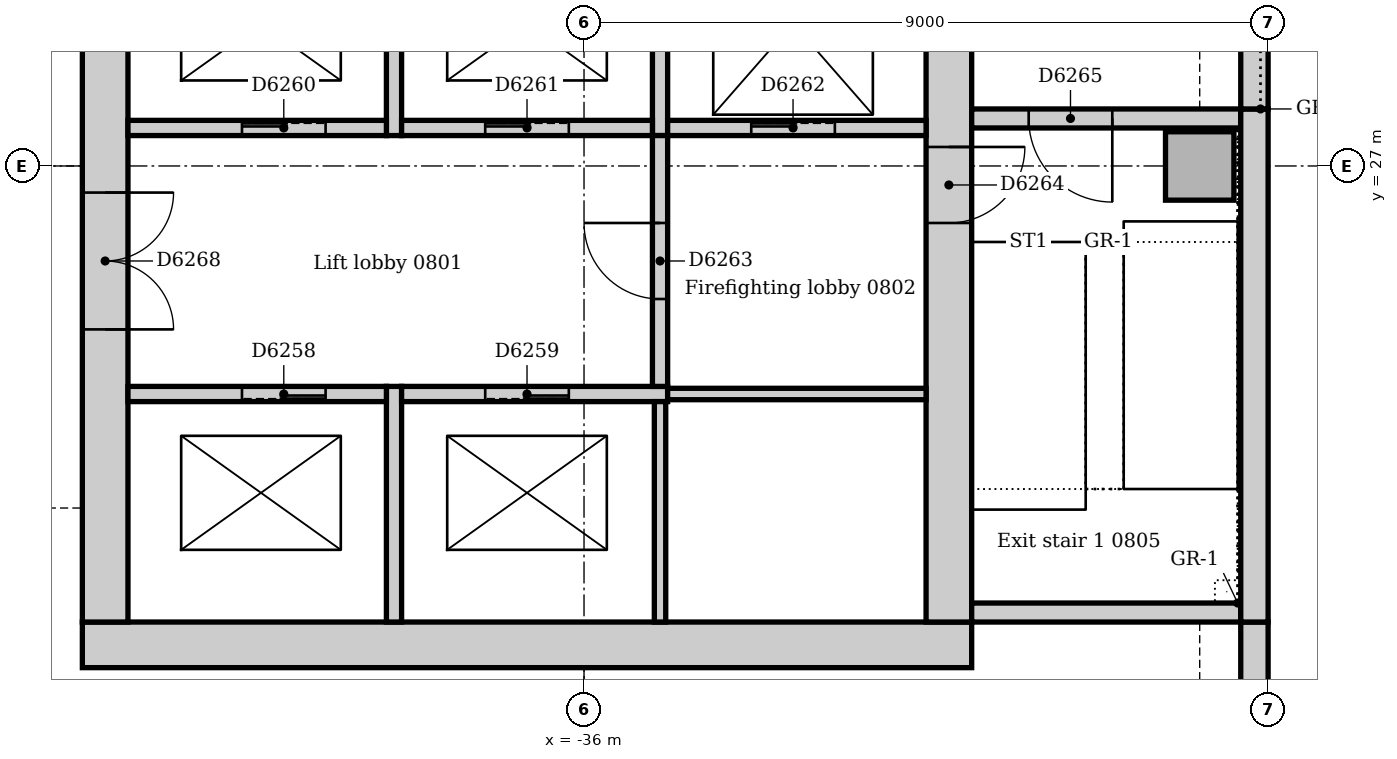
"""IFC4 building model, lengths in metres.
Left out: names, types, materials, properties, quantities, classifications, styles, units other than length and angle.
Written with IfcOpenShell. Run it as: python <this file> out.ifc"""

import sys

from ifc_helpers import new_model, si_unit, direction, frame, frame_2d, origin, origin_2d, place, context, subcontext, project, spatial, rectangle, extrude, element, fill, save


model = new_model("IFC4")
c1 = context("Model", 3, precision=1e-05, world=origin(), true_north=direction((0.0, 1.0)))
c2 = subcontext(c1, "Body", "Model", "MODEL_VIEW")
j1 = project(units=[si_unit("LENGTHUNIT", "METRE"), si_unit("PLANEANGLEUNIT", "RADIAN")], contexts=[c1])
p1 = place(None, origin())
s1 = spatial("IfcSite", under=j1, at=p1, CompositionType="ELEMENT")
p2 = place(p1, origin())
s2 = spatial("IfcBuilding", under=s1, at=p2, CompositionType="ELEMENT")
p3 = place(p2, frame((0.0, 0.0, 38.0)))
s3 = spatial("IfcBuildingStorey", under=s2, at=p3, CompositionType="ELEMENT", Elevation=38.0)
p4 = place(p3, frame((-42.6, 20.7, 0.0), z_axis=(0.0, 0.0, 1.0), x_axis=(1.0, 0.0, 0.0)))
e1 = element("IfcWall", 1, at=p4, inside=s3, PredefinedType="SOLIDWALL", context=c2, shape_type="SweptSolid", body=[
    extrude(rectangle(XDim=11.7, YDim=0.6, at=frame_2d((5.85, 0.0))), origin(), (0.0, 0.0, 1.0), 4.0),
])
p5 = place(p3, frame((-31.2, 21.0, 0.0), z_axis=(0.0, 0.0, 1.0), x_axis=(0.0, 1.0, 0.0)))
e2 = element("IfcWall", 2, at=p5, inside=s3, PredefinedType="SOLIDWALL", context=c2, shape_type="SweptSolid", body=[
    extrude(rectangle(XDim=9.5, YDim=0.6, at=frame_2d((4.75, 0.0))), origin(), (0.0, 0.0, 1.0), 4.0),
])
p6 = place(p5, frame((5.25, 0.0, 0.0)))
e3 = element("IfcOpeningElement", 3, at=p6, cuts=e2, PredefinedType="OPENING", context=c2, shape_type="SweptSolid", body=[
    extrude(rectangle(XDim=1.0, YDim=2.1, at=frame_2d((0.5, 1.05))), frame((0.0, 0.31, 0.0), z_axis=(0.0, -1.0, 0.0), x_axis=(1.0, 0.0, 0.0)), (0.0, 0.0, 1.0), 0.62),
])
p7 = place(p3, frame((-42.3, 30.5, 0.0), z_axis=(0.0, 0.0, 1.0), x_axis=(0.0, -1.0, 0.0)))
e4 = element("IfcWall", 4, at=p7, inside=s3, PredefinedType="SOLIDWALL", context=c2, shape_type="SweptSolid", body=[
    extrude(rectangle(XDim=9.5, YDim=0.6, at=frame_2d((4.75, 0.0))), origin(), (0.0, 0.0, 1.0), 4.0),
])
p8 = place(p7, frame((3.85, 0.0, 0.0)))
e5 = element("IfcOpeningElement", 5, at=p8, cuts=e4, PredefinedType="OPENING", context=c2, shape_type="SweptSolid", body=[
    extrude(rectangle(XDim=1.8, YDim=2.1, at=frame_2d((0.9, 1.05))), frame((0.0, 0.31, 0.0), z_axis=(0.0, -1.0, 0.0), x_axis=(1.0, 0.0, 0.0)), (0.0, 0.0, 1.0), 0.62),
])
p9 = place(p3, frame((-30.9, 21.125, 0.0), z_axis=(0.0, 0.0, 1.0), x_axis=(1.0, 0.0, 0.0)))
e6 = element("IfcWall", 6, at=p9, inside=s3, PredefinedType="SOLIDWALL", context=c2, shape_type="SweptSolid", body=[
    extrude(rectangle(XDim=3.54, YDim=0.25, at=frame_2d((1.77, 0.0))), origin(), (0.0, 0.0, 1.0), 4.0),
])
p10 = place(p3, frame((-27.36, 27.625, 0.0), z_axis=(0.0, 0.0, 1.0), x_axis=(-1.0, 0.0, 0.0)))
e7 = element("IfcWall", 7, at=p10, inside=s3, PredefinedType="SOLIDWALL", context=c2, shape_type="SweptSolid", body=[
    extrude(rectangle(XDim=3.54, YDim=0.25, at=frame_2d((1.77, 0.0))), origin(), (0.0, 0.0, 1.0), 4.0),
])
p11 = place(p10, frame((1.69, 0.0, 0.0)))
e8 = element("IfcOpeningElement", 8, at=p11, cuts=e7, PredefinedType="OPENING", context=c2, shape_type="SweptSolid", body=[
    extrude(rectangle(XDim=1.1, YDim=2.1, at=frame_2d((0.55, 1.05))), frame((0.0, 0.135, 0.0), z_axis=(0.0, -1.0, 0.0), x_axis=(1.0, 0.0, 0.0)), (0.0, 0.0, 1.0), 0.27),
])
p12 = place(p3, frame((-27.9, 27.0, 0.0), z_axis=(0.0, 0.0, 1.0), x_axis=(1.0, 0.0, 0.0)))
e9 = element("IfcColumn", 9, at=p12, inside=s3, PredefinedType="COLUMN", context=c2, shape_type="SweptSolid", body=[
    extrude(rectangle(XDim=0.9, YDim=0.9, at=origin_2d()), origin(), (0.0, 0.0, 1.0), 4.0),
])
p13 = place(p3, frame((-27.18, 8.743, 0.0), z_axis=(0.0, 0.0, 1.0), x_axis=(0.0, 1.0, 0.0)))
e10 = element("IfcWall", 10, at=p13, inside=s3, PredefinedType="STANDARD", context=c2, shape_type="SweptSolid", body=[
    extrude(rectangle(XDim=12.257, YDim=0.36, at=frame_2d((6.129, 0.0))), origin(), (0.0, 0.0, 1.0), 3.85),
])
p14 = place(p13, frame((2.607, 0.0, 0.9)))
e11 = element("IfcOpeningElement", 11, at=p14, cuts=e10, PredefinedType="OPENING", context=c2, shape_type="SweptSolid", body=[
    extrude(rectangle(XDim=3.3, YDim=1.6, at=frame_2d((1.65, 0.8))), frame((0.0, 0.19, 0.0), z_axis=(0.0, -1.0, 0.0), x_axis=(1.0, 0.0, 0.0)), (0.0, 0.0, 1.0), 0.38),
])
p15 = place(p13, frame((7.607, 0.0, 0.9)))
e12 = element("IfcOpeningElement", 12, at=p15, cuts=e10, PredefinedType="OPENING", context=c2, shape_type="SweptSolid", body=[
    extrude(rectangle(XDim=3.3, YDim=1.6, at=frame_2d((1.65, 0.8))), frame((0.0, 0.19, 0.0), z_axis=(0.0, -1.0, 0.0), x_axis=(1.0, 0.0, 0.0)), (0.0, 0.0, 1.0), 0.38),
])
p16 = place(p3, frame((-27.18, 21.0, 0.0), z_axis=(0.0, 0.0, 1.0), x_axis=(0.0, 1.0, 0.0)))
e13 = element("IfcWall", 13, at=p16, inside=s3, PredefinedType="STANDARD", context=c2, shape_type="SweptSolid", body=[
    extrude(rectangle(XDim=6.75, YDim=0.36, at=frame_2d((3.375, 0.0))), origin(), (0.0, 0.0, 1.0), 3.85),
])
p17 = place(p3, frame((-27.18, 27.75, 0.0), z_axis=(0.0, 0.0, 1.0), x_axis=(0.0, 1.0, 0.0)))
e14 = element("IfcWall", 14, at=p17, inside=s3, PredefinedType="STANDARD", context=c2, shape_type="SweptSolid", body=[
    extrude(rectangle(XDim=7.5, YDim=0.36, at=frame_2d((3.75, 0.0))), origin(), (0.0, 0.0, 1.0), 3.85),
])
p18 = place(p17, frame((2.85, 0.0, 1.2)))
e15 = element("IfcOpeningElement", 15, at=p18, cuts=e14, PredefinedType="OPENING", context=c2, shape_type="SweptSolid", body=[
    extrude(rectangle(XDim=1.8, YDim=1.2, at=frame_2d((0.9, 0.6))), frame((0.0, 0.19, 0.0), z_axis=(0.0, -1.0, 0.0), x_axis=(1.0, 0.0, 0.0)), (0.0, 0.0, 1.0), 0.38),
])
p19 = place(p3, frame((-38.5, 21.0, 0.0), z_axis=(0.0, 0.0, 1.0), x_axis=(0.0, 1.0, 0.0)))
e16 = element("IfcWall", 16, at=p19, inside=s3, PredefinedType="SOLIDWALL", context=c2, shape_type="SweptSolid", body=[
    extrude(rectangle(XDim=3.1, YDim=0.2, at=frame_2d((1.55, 0.0))), origin(), (0.0, 0.0, 1.0), 4.0),
])
p20 = place(p3, frame((-38.6, 24.0, 0.0), z_axis=(0.0, 0.0, 1.0), x_axis=(-1.0, 0.0, 0.0)))
e17 = element("IfcWall", 17, at=p20, inside=s3, PredefinedType="SOLIDWALL", context=c2, shape_type="SweptSolid", body=[
    extrude(rectangle(XDim=3.4, YDim=0.2, at=frame_2d((1.7, 0.0))), origin(), (0.0, 0.0, 1.0), 4.0),
])
p21 = place(p20, frame((0.8, 0.0, 0.0)))
e18 = element("IfcOpeningElement", 18, at=p21, cuts=e17, PredefinedType="OPENING", context=c2, shape_type="SweptSolid", body=[
    extrude(rectangle(XDim=1.1, YDim=2.1, at=frame_2d((0.55, 1.05))), frame((0.0, 0.11, 0.0), z_axis=(0.0, -1.0, 0.0), x_axis=(1.0, 0.0, 0.0)), (0.0, 0.0, 1.0), 0.22),
])
p22 = place(p3, frame((-34.9, 24.0, 0.0), z_axis=(0.0, 0.0, 1.0), x_axis=(-1.0, 0.0, 0.0)))
e19 = element("IfcWall", 19, at=p22, inside=s3, PredefinedType="SOLIDWALL", context=c2, shape_type="SweptSolid", body=[
    extrude(rectangle(XDim=3.5, YDim=0.2, at=frame_2d((1.75, 0.0))), origin(), (0.0, 0.0, 1.0), 4.0),
])
p23 = place(p22, frame((1.3, 0.0, 0.0)))
e20 = element("IfcOpeningElement", 20, at=p23, cuts=e19, PredefinedType="OPENING", context=c2, shape_type="SweptSolid", body=[
    extrude(rectangle(XDim=1.1, YDim=2.1, at=frame_2d((0.55, 1.05))), frame((0.0, 0.11, 0.0), z_axis=(0.0, -1.0, 0.0), x_axis=(1.0, 0.0, 0.0)), (0.0, 0.0, 1.0), 0.22),
])
p24 = place(p3, frame((-38.5, 27.4, 0.0), z_axis=(0.0, 0.0, 1.0), x_axis=(0.0, 1.0, 0.0)))
e21 = element("IfcWall", 21, at=p24, inside=s3, PredefinedType="SOLIDWALL", context=c2, shape_type="SweptSolid", body=[
    extrude(rectangle(XDim=2.85, YDim=0.2, at=frame_2d((1.425, 0.0))), origin(), (0.0, 0.0, 1.0), 4.0),
])
p25 = place(p3, frame((-42.0, 27.5, 0.0), z_axis=(0.0, 0.0, 1.0), x_axis=(1.0, 0.0, 0.0)))
e22 = element("IfcWall", 22, at=p25, inside=s3, PredefinedType="SOLIDWALL", context=c2, shape_type="SweptSolid", body=[
    extrude(rectangle(XDim=3.4, YDim=0.2, at=frame_2d((1.7, 0.0))), origin(), (0.0, 0.0, 1.0), 4.0),
])
p26 = place(p25, frame((1.5, 0.0, 0.0)))
e23 = element("IfcOpeningElement", 23, at=p26, cuts=e22, PredefinedType="OPENING", context=c2, shape_type="SweptSolid", body=[
    extrude(rectangle(XDim=1.1, YDim=2.1, at=frame_2d((0.55, 1.05))), frame((0.0, 0.11, 0.0), z_axis=(0.0, -1.0, 0.0), x_axis=(1.0, 0.0, 0.0)), (0.0, 0.0, 1.0), 0.22),
])
p27 = place(p3, frame((-35.0, 27.4, 0.0), z_axis=(0.0, 0.0, 1.0), x_axis=(0.0, 1.0, 0.0)))
e24 = element("IfcWall", 24, at=p27, inside=s3, PredefinedType="SOLIDWALL", context=c2, shape_type="SweptSolid", body=[
    extrude(rectangle(XDim=2.85, YDim=0.2, at=frame_2d((1.425, 0.0))), origin(), (0.0, 0.0, 1.0), 4.0),
])
p28 = place(p3, frame((-38.4, 27.5, 0.0), z_axis=(0.0, 0.0, 1.0), x_axis=(1.0, 0.0, 0.0)))
e25 = element("IfcWall", 25, at=p28, inside=s3, PredefinedType="SOLIDWALL", context=c2, shape_type="SweptSolid", body=[
    extrude(rectangle(XDim=3.3, YDim=0.2, at=frame_2d((1.65, 0.0))), origin(), (0.0, 0.0, 1.0), 4.0),
])
p29 = place(p28, frame((1.1, 0.0, 0.0)))
e26 = element("IfcOpeningElement", 26, at=p29, cuts=e25, PredefinedType="OPENING", context=c2, shape_type="SweptSolid", body=[
    extrude(rectangle(XDim=1.1, YDim=2.1, at=frame_2d((0.55, 1.05))), frame((0.0, 0.11, 0.0), z_axis=(0.0, -1.0, 0.0), x_axis=(1.0, 0.0, 0.0)), (0.0, 0.0, 1.0), 0.22),
])
p30 = place(p3, frame((-34.9, 27.5, 0.0), z_axis=(0.0, 0.0, 1.0), x_axis=(1.0, 0.0, 0.0)))
e27 = element("IfcWall", 27, at=p30, inside=s3, PredefinedType="SOLIDWALL", context=c2, shape_type="SweptSolid", body=[
    extrude(rectangle(XDim=3.4, YDim=0.2, at=frame_2d((1.7, 0.0))), origin(), (0.0, 0.0, 1.0), 4.0),
])
p31 = place(p30, frame((1.1, 0.0, 0.0)))
e28 = element("IfcOpeningElement", 28, at=p31, cuts=e27, PredefinedType="OPENING", context=c2, shape_type="SweptSolid", body=[
    extrude(rectangle(XDim=1.1, YDim=2.1, at=frame_2d((0.55, 1.05))), frame((0.0, 0.11, 0.0), z_axis=(0.0, -1.0, 0.0), x_axis=(1.0, 0.0, 0.0)), (0.0, 0.0, 1.0), 0.22),
])
p32 = place(p3, frame((-35.0, 24.1, 0.0), z_axis=(0.0, 0.0, 1.0), x_axis=(0.0, 1.0, 0.0)))
e29 = element("IfcWall", 29, at=p32, inside=s3, PredefinedType="SOLIDWALL", context=c2, shape_type="SweptSolid", body=[
    extrude(rectangle(XDim=3.3, YDim=0.2, at=frame_2d((1.65, 0.0))), origin(), (0.0, 0.0, 1.0), 4.0),
])
p33 = place(p32, frame((1.15, 0.0, 0.0)))
e30 = element("IfcOpeningElement", 30, at=p33, cuts=e29, PredefinedType="OPENING", context=c2, shape_type="SweptSolid", body=[
    extrude(rectangle(XDim=1.0, YDim=2.1, at=frame_2d((0.5, 1.05))), frame((0.0, 0.11, 0.0), z_axis=(0.0, -1.0, 0.0), x_axis=(1.0, 0.0, 0.0)), (0.0, 0.0, 1.0), 0.22),
])
p34 = place(p3, frame((-35.0, 21.0, 0.0), z_axis=(0.0, 0.0, 1.0), x_axis=(0.0, 1.0, 0.0)))
e31 = element("IfcWall", 31, at=p34, inside=s3, PredefinedType="SOLIDWALL", context=c2, shape_type="SweptSolid", body=[
    extrude(rectangle(XDim=2.9, YDim=0.15, at=frame_2d((1.45, 0.0))), origin(), (0.0, 0.0, 1.0), 4.0),
])
p35 = place(p3, frame((-31.5, 24.0, 0.0), z_axis=(0.0, 0.0, 1.0), x_axis=(-1.0, 0.0, 0.0)))
e32 = element("IfcWall", 32, at=p35, inside=s3, PredefinedType="SOLIDWALL", context=c2, shape_type="SweptSolid", body=[
    extrude(rectangle(XDim=3.4, YDim=0.15, at=frame_2d((1.7, 0.0))), origin(), (0.0, 0.0, 1.0), 4.0),
])
p36 = place(p21, origin())
e33 = element("IfcDoor", 33, at=p36, inside=s3, OperationType="SLIDING_TO_LEFT", PredefinedType="DOOR", context=c2, shape_type="SweptSolid", body=[
    extrude(rectangle(XDim=1.1, YDim=2.1, at=frame_2d((0.55, 1.05))), frame((0.0, 0.025, 0.0), z_axis=(0.0, -1.0, 0.0), x_axis=(1.0, 0.0, 0.0)), (0.0, 0.0, 1.0), 0.05),
])
fill(e18, e33)
p37 = place(p23, origin())
e34 = element("IfcDoor", 34, at=p37, inside=s3, OperationType="SLIDING_TO_LEFT", PredefinedType="DOOR", context=c2, shape_type="SweptSolid", body=[
    extrude(rectangle(XDim=1.1, YDim=2.1, at=frame_2d((0.55, 1.05))), frame((0.0, 0.025, 0.0), z_axis=(0.0, -1.0, 0.0), x_axis=(1.0, 0.0, 0.0)), (0.0, 0.0, 1.0), 0.05),
])
fill(e20, e34)
p38 = place(p26, origin())
e35 = element("IfcDoor", 35, at=p38, inside=s3, OperationType="SLIDING_TO_LEFT", PredefinedType="DOOR", context=c2, shape_type="SweptSolid", body=[
    extrude(rectangle(XDim=1.1, YDim=2.1, at=frame_2d((0.55, 1.05))), frame((0.0, 0.025, 0.0), z_axis=(0.0, -1.0, 0.0), x_axis=(1.0, 0.0, 0.0)), (0.0, 0.0, 1.0), 0.05),
])
fill(e23, e35)
p39 = place(p29, origin())
e36 = element("IfcDoor", 36, at=p39, inside=s3, OperationType="SLIDING_TO_LEFT", PredefinedType="DOOR", context=c2, shape_type="SweptSolid", body=[
    extrude(rectangle(XDim=1.1, YDim=2.1, at=frame_2d((0.55, 1.05))), frame((0.0, 0.025, 0.0), z_axis=(0.0, -1.0, 0.0), x_axis=(1.0, 0.0, 0.0)), (0.0, 0.0, 1.0), 0.05),
])
fill(e26, e36)
p40 = place(p31, origin())
e37 = element("IfcDoor", 37, at=p40, inside=s3, OperationType="SLIDING_TO_LEFT", PredefinedType="DOOR", context=c2, shape_type="SweptSolid", body=[
    extrude(rectangle(XDim=1.1, YDim=2.1, at=frame_2d((0.55, 1.05))), frame((0.0, 0.025, 0.0), z_axis=(0.0, -1.0, 0.0), x_axis=(1.0, 0.0, 0.0)), (0.0, 0.0, 1.0), 0.05),
])
fill(e28, e37)
p41 = place(p33, origin())
e38 = element("IfcDoor", 38, at=p41, inside=s3, OperationType="SINGLE_SWING_RIGHT", PredefinedType="DOOR", context=c2, shape_type="SweptSolid", body=[
    extrude(rectangle(XDim=1.0, YDim=2.1, at=frame_2d((0.5, 1.05))), frame((0.0, 0.025, 0.0), z_axis=(0.0, -1.0, 0.0), x_axis=(1.0, 0.0, 0.0)), (0.0, 0.0, 1.0), 0.05),
])
fill(e30, e38)
p42 = place(p6, frame((1.0, 0.0, 0.0), z_axis=(0.0, 0.0, 1.0), x_axis=(-1.0, 0.0, 0.0)))
e39 = element("IfcDoor", 39, at=p42, inside=s3, OperationType="SINGLE_SWING_LEFT", PredefinedType="DOOR", context=c2, shape_type="SweptSolid", body=[
    extrude(rectangle(XDim=1.0, YDim=2.1, at=frame_2d((0.5, 1.05))), frame((0.0, 0.025, 0.0), z_axis=(0.0, -1.0, 0.0), x_axis=(1.0, 0.0, 0.0)), (0.0, 0.0, 1.0), 0.05),
])
fill(e3, e39)
p43 = place(p11, origin())
e40 = element("IfcDoor", 40, at=p43, inside=s3, OperationType="SINGLE_SWING_LEFT", PredefinedType="DOOR", context=c2, shape_type="SweptSolid", body=[
    extrude(rectangle(XDim=1.1, YDim=2.1, at=frame_2d((0.55, 1.05))), frame((0.0, 0.025, 0.0), z_axis=(0.0, -1.0, 0.0), x_axis=(1.0, 0.0, 0.0)), (0.0, 0.0, 1.0), 0.05),
])
fill(e8, e40)
p44 = place(p8, origin())
e41 = element("IfcDoor", 41, at=p44, inside=s3, OperationType="DOUBLE_DOOR_SINGLE_SWING", PredefinedType="DOOR", context=c2, shape_type="SweptSolid", body=[
    extrude(rectangle(XDim=1.8, YDim=2.1, at=frame_2d((0.9, 1.05))), frame((0.0, 0.025, 0.0), z_axis=(0.0, -1.0, 0.0), x_axis=(1.0, 0.0, 0.0)), (0.0, 0.0, 1.0), 0.05),
])
fill(e5, e41)
save(model, sys.argv[1])
